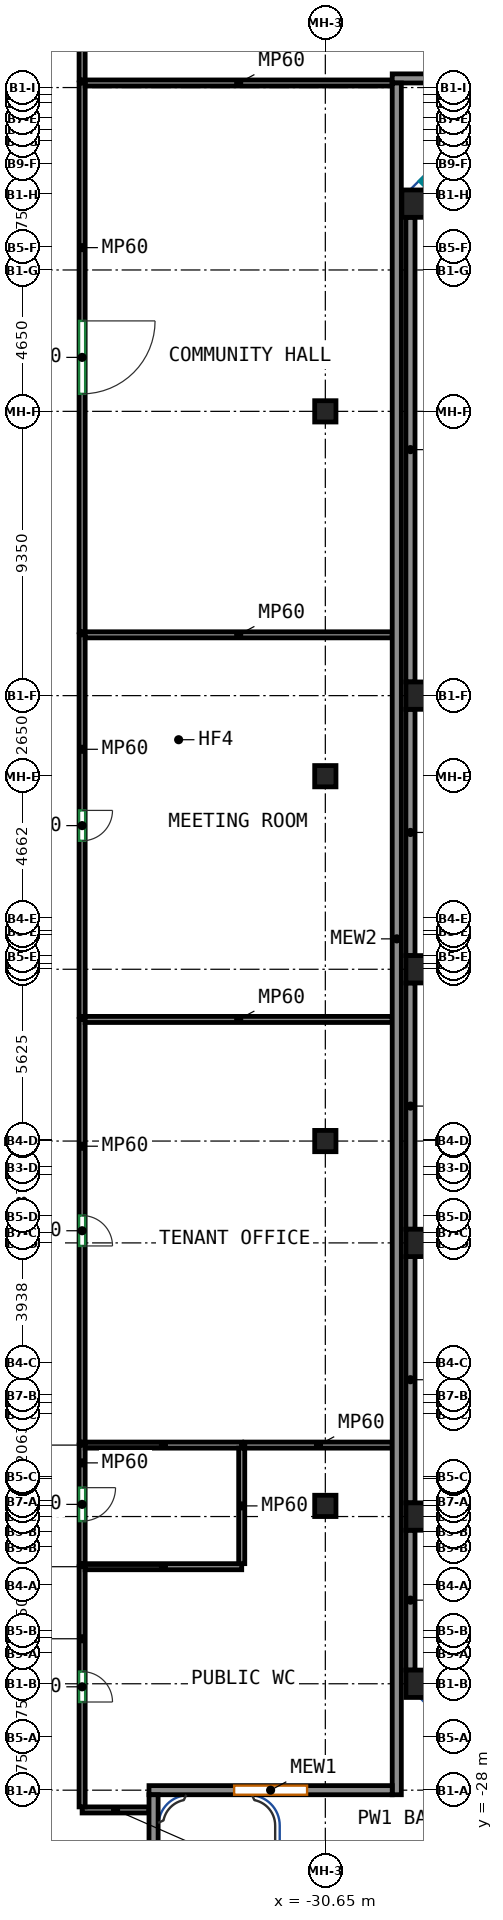
"""IFC4 building model, lengths in metres.
Left out: names, types, materials, properties, quantities, classifications, styles, units other than length and angle.
Written with IfcOpenShell. Run it as: python <this file> out.ifc"""

import sys

from ifc_helpers import new_model, si_unit, direction, frame, frame_2d, origin, origin_2d, place, context, subcontext, project, spatial, rectangle, extrude, source, transform, mapped, element, fill, save


model = new_model("IFC4")
c1 = context("Model", 3, precision=1e-05, world=origin(), true_north=direction((0.0, 1.0)))
c2 = subcontext(c1, "Body", "Model", "MODEL_VIEW")
j1 = project(units=[si_unit("LENGTHUNIT", "METRE"), si_unit("PLANEANGLEUNIT", "RADIAN")], contexts=[c1])
p1 = place(None, origin())
s1 = spatial("IfcSite", under=j1, at=p1, CompositionType="ELEMENT")
p2 = place(p1, origin())
s2 = spatial("IfcBuilding", under=s1, at=p2, CompositionType="ELEMENT")
p3 = place(p2, frame((0.0, 0.0, 18.0)))
s3 = spatial("IfcBuildingStorey", under=s2, at=p3, CompositionType="ELEMENT", Elevation=18.0)
m1 = source(origin(), c2, "Body", "SweptSolid", [
    extrude(rectangle(XDim=0.9, YDim=0.9, at=origin_2d()), origin(), (0.0, 0.0, 1.0), 4.1),
])
for number, where, z_axis, x_axis in (
    (1, (-27.682, 24.182, 0.0), (0.0, 0.0, 1.0), (1.0, 0.0, 0.0)),
    (2, (-27.55, -24.5, 0.0), (0.0, 0.0, 1.0), (1.0, 0.0, 0.0)),
    (3, (-27.55, -19.0, 0.0), (0.0, 0.0, 1.0), (1.0, 0.0, 0.0)),
    (4, (-27.55, -10.0, 0.0), (0.0, 0.0, 1.0), (1.0, 0.0, 0.0)),
    (5, (-27.55, -1.0, 0.0), (0.0, 0.0, 1.0), (1.0, 0.0, 0.0)),
    (6, (-27.55, 8.0, 0.0), (0.0, 0.0, 1.0), (1.0, 0.0, 0.0)),
):
    element("IfcColumn", number, at=place(p3, frame(where, z_axis=z_axis, x_axis=x_axis)), inside=s3, PredefinedType="COLUMN", context=c2, shape_type="MappedRepresentation", body=[
        mapped(m1, transform((0.0, 0.0, 0.0))),
    ])
m2 = source(origin(), c2, "Body", "SweptSolid", [
    extrude(rectangle(XDim=0.7, YDim=0.7, at=origin_2d()), origin(), (0.0, 0.0, 1.0), 4.1),
])
for number, where, z_axis, x_axis in (
    (7, (-30.65, -18.65, 0.0), (0.0, 0.0, 1.0), (1.0, 0.0, 0.0)),
    (8, (-30.65, -6.65, 0.0), (0.0, 0.0, 1.0), (1.0, 0.0, 0.0)),
    (9, (-30.65, 5.35, 0.0), (0.0, 0.0, 1.0), (1.0, 0.0, 0.0)),
    (10, (-30.65, 17.35, 0.0), (0.0, 0.0, 1.0), (1.0, 0.0, 0.0)),
):
    element("IfcColumn", number, at=place(p3, frame(where, z_axis=z_axis, x_axis=x_axis)), inside=s3, PredefinedType="COLUMN", context=c2, shape_type="MappedRepresentation", body=[
        mapped(m2, transform((0.0, 0.0, 0.0))),
    ])
m3 = source(origin(), c2, "Body", "SweptSolid", [
    extrude(rectangle(XDim=15.282, YDim=0.3, at=frame_2d((7.641, 0.0))), origin(), (0.0, 0.0, 1.0), 4.1),
])
p4 = place(p3, frame((-27.85, 23.732, 0.0), z_axis=(0.0, 0.0, 1.0), x_axis=(0.0, -1.0, 0.0)))
e11 = element("IfcWall", 11, at=p4, inside=s3, PredefinedType="SOLIDWALL", context=c2, shape_type="MappedRepresentation", body=[
    mapped(m3, transform((0.0, 0.0, 0.0))),
])
m4 = source(origin(), c2, "Body", "SweptSolid", [
    extrude(rectangle(XDim=8.1, YDim=0.3, at=frame_2d((4.05, 0.0))), origin(), (0.0, 0.0, 1.0), 4.1),
])
for number, where, z_axis, x_axis in (
    (12, (-27.85, 7.55, 0.0), (0.0, 0.0, 1.0), (0.0, -1.0, 0.0)),
    (13, (-27.85, -1.45, 0.0), (0.0, 0.0, 1.0), (0.0, -1.0, 0.0)),
    (14, (-27.85, -10.45, 0.0), (0.0, 0.0, 1.0), (0.0, -1.0, 0.0)),
):
    element("IfcWall", number, at=place(p3, frame(where, z_axis=z_axis, x_axis=x_axis)), inside=s3, PredefinedType="SOLIDWALL", context=c2, shape_type="MappedRepresentation", body=[
        mapped(m4, transform((0.0, 0.0, 0.0))),
    ])
m5 = source(origin(), c2, "Body", "SweptSolid", [
    extrude(rectangle(XDim=4.6, YDim=0.3, at=frame_2d((2.3, 0.0))), origin(), (0.0, 0.0, 1.0), 4.1),
])
p5 = place(p3, frame((-27.85, -19.45, 0.0), z_axis=(0.0, 0.0, 1.0), x_axis=(0.0, -1.0, 0.0)))
e15 = element("IfcWall", 15, at=p5, inside=s3, PredefinedType="SOLIDWALL", context=c2, shape_type="MappedRepresentation", body=[
    mapped(m5, transform((0.0, 0.0, 0.0))),
])
m6 = source(origin(), c2, "Body", "SweptSolid", [
    extrude(rectangle(XDim=56.3, YDim=0.3, at=frame_2d((28.15, 0.0))), origin(), (0.0, 0.0, 1.0), 4.1),
])
p6 = place(p3, frame((27.85, 28.3, 0.0), z_axis=(0.0, 0.0, 1.0), x_axis=(-1.0, 0.0, 0.0)))
e16 = element("IfcWall", 16, at=p6, inside=s3, PredefinedType="SOLIDWALL", context=c2, shape_type="MappedRepresentation", body=[
    mapped(m6, transform((0.0, 0.0, 0.0))),
])
m7 = source(origin(), c2, "Body", "SweptSolid", [
    extrude(rectangle(XDim=56.3, YDim=0.3, at=frame_2d((28.15, 0.0))), origin(), (0.0, 0.0, 1.0), 4.1),
])
p7 = place(p3, frame((-28.3, 28.15, 0.0), z_axis=(0.0, 0.0, 1.0), x_axis=(0.0, -1.0, 0.0)))
e17 = element("IfcWall", 17, at=p7, inside=s3, PredefinedType="SOLIDWALL", context=c2, shape_type="MappedRepresentation", body=[
    mapped(m7, transform((0.0, 0.0, 0.0))),
])
m8 = source(origin(), c2, "Body", "SweptSolid", [
    extrude(rectangle(XDim=8.0, YDim=0.3, at=frame_2d((4.0, 0.0))), origin(), (0.0, 0.0, 1.0), 4.1),
])
p8 = place(p3, frame((-28.45, -28.0, 0.0), z_axis=(0.0, 0.0, 1.0), x_axis=(-1.0, 0.0, 0.0)))
e18 = element("IfcWall", 18, at=p8, inside=s3, PredefinedType="SOLIDWALL", context=c2, shape_type="MappedRepresentation", body=[
    mapped(m8, transform((0.0, 0.0, 0.0))),
])
p9 = place(p8, frame((2.8, 0.0, 0.9)))
e19 = element("IfcOpeningElement", 19, at=p9, cuts=e18, PredefinedType="OPENING", context=c2, shape_type="SweptSolid", body=[
    extrude(rectangle(XDim=2.4, YDim=1.8, at=frame_2d((1.2, 0.9))), frame((0.0, 0.16, 0.0), z_axis=(0.0, -1.0, 0.0), x_axis=(1.0, 0.0, 0.0)), (0.0, 0.0, 1.0), 0.32),
])
m9 = source(origin(), c2, "Body", "SweptSolid", [
    extrude(rectangle(XDim=15.7, YDim=0.3, at=frame_2d((7.85, 0.0))), origin(), (0.0, 0.0, 1.0), 4.1),
])
p10 = place(p3, frame((-36.3, -28.15, 0.0), z_axis=(0.0, 0.0, 1.0), x_axis=(0.0, -1.0, 0.0)))
e20 = element("IfcWall", 20, at=p10, inside=s3, PredefinedType="SOLIDWALL", context=c2, shape_type="MappedRepresentation", body=[
    mapped(m9, transform((0.0, 0.0, 0.0))),
])
p11 = place(p10, frame((6.326, 0.0, 0.0)))
e21 = element("IfcOpeningElement", 21, at=p11, cuts=e20, PredefinedType="OPENING", context=c2, shape_type="SweptSolid", body=[
    extrude(rectangle(XDim=2.4, YDim=2.4, at=frame_2d((1.2, 1.2))), frame((0.0, 0.16, 0.0), z_axis=(0.0, -1.0, 0.0), x_axis=(1.0, 0.0, 0.0)), (0.0, 0.0, 1.0), 0.32),
])
p12 = place(p10, frame((10.997, 0.0, 0.0)))
e22 = element("IfcOpeningElement", 22, at=p12, cuts=e20, PredefinedType="OPENING", context=c2, shape_type="SweptSolid", body=[
    extrude(rectangle(XDim=2.4, YDim=2.4, at=frame_2d((1.2, 1.2))), frame((0.0, 0.16, 0.0), z_axis=(0.0, -1.0, 0.0), x_axis=(1.0, 0.0, 0.0)), (0.0, 0.0, 1.0), 0.32),
])
m10 = source(origin(), c2, "Body", "SweptSolid", [
    extrude(rectangle(XDim=2.2, YDim=0.2, at=frame_2d((1.1, 0.0))), origin(), (0.0, 0.0, 1.0), 3.5),
])
p13 = place(p3, frame((-38.65, -28.65, 0.0), z_axis=(0.0, 0.0, 1.0), x_axis=(1.0, 0.0, 0.0)))
e23 = element("IfcWall", 23, at=p13, inside=s3, PredefinedType="PARTITIONING", context=c2, shape_type="MappedRepresentation", body=[
    mapped(m10, transform((0.0, 0.0, 0.0))),
])
m11 = source(origin(), c2, "Body", "SweptSolid", [
    extrude(rectangle(XDim=7.9, YDim=0.2, at=frame_2d((3.95, 0.0))), origin(), (0.0, 0.0, 1.0), 4.1),
])
p14 = place(p3, frame((-38.65, -20.65, 0.0), z_axis=(0.0, 0.0, 1.0), x_axis=(0.0, -1.0, 0.0)))
e24 = element("IfcWall", 24, at=p14, inside=s3, PredefinedType="PARTITIONING", context=c2, shape_type="MappedRepresentation", body=[
    mapped(m11, transform((0.0, 0.0, 0.0))),
])
p15 = place(p14, frame((3.45, 0.0, 0.0)))
e25 = element("IfcOpeningElement", 25, at=p15, cuts=e24, PredefinedType="OPENING", context=c2, shape_type="SweptSolid", body=[
    extrude(rectangle(XDim=1.0, YDim=2.1, at=frame_2d((0.5, 1.05))), frame((0.0, 0.11, 0.0), z_axis=(0.0, -1.0, 0.0), x_axis=(1.0, 0.0, 0.0)), (0.0, 0.0, 1.0), 0.22),
])
m12 = source(origin(), c2, "Body", "SweptSolid", [
    extrude(rectangle(XDim=5.15, YDim=0.2, at=frame_2d((2.575, 0.0))), origin(), (0.0, 0.0, 1.0), 3.5),
])
p16 = place(p3, frame((-38.55, -20.65, 0.0), z_axis=(0.0, 0.0, 1.0), x_axis=(1.0, 0.0, 0.0)))
e26 = element("IfcWall", 26, at=p16, inside=s3, PredefinedType="PARTITIONING", context=c2, shape_type="MappedRepresentation", body=[
    mapped(m12, transform((0.0, 0.0, 0.0))),
])
m13 = source(origin(), c2, "Body", "SweptSolid", [
    extrude(rectangle(XDim=3.9, YDim=0.2, at=frame_2d((1.95, 0.0))), origin(), (0.0, 0.0, 1.0), 3.3),
])
p17 = place(p3, frame((-38.65, -16.65, 0.0), z_axis=(0.0, 0.0, 1.0), x_axis=(0.0, -1.0, 0.0)))
e27 = element("IfcWall", 27, at=p17, inside=s3, PredefinedType="PARTITIONING", context=c2, shape_type="MappedRepresentation", body=[
    mapped(m13, transform((0.0, 0.0, 0.0))),
])
p18 = place(p17, frame((1.4, 0.0, 0.0)))
e28 = element("IfcOpeningElement", 28, at=p18, cuts=e27, PredefinedType="OPENING", context=c2, shape_type="SweptSolid", body=[
    extrude(rectangle(XDim=1.1, YDim=2.1, at=frame_2d((0.55, 1.05))), frame((0.0, 0.11, 0.0), z_axis=(0.0, -1.0, 0.0), x_axis=(1.0, 0.0, 0.0)), (0.0, 0.0, 1.0), 0.22),
])
p19 = place(p3, frame((-38.55, -16.65, 0.0), z_axis=(0.0, 0.0, 1.0), x_axis=(1.0, 0.0, 0.0)))
e29 = element("IfcWall", 29, at=p19, inside=s3, PredefinedType="PARTITIONING", context=c2, shape_type="MappedRepresentation", body=[
    mapped(m12, transform((0.0, 0.0, 0.0))),
])
m14 = source(origin(), c2, "Body", "SweptSolid", [
    extrude(rectangle(XDim=13.9, YDim=0.2, at=frame_2d((6.95, 0.0))), origin(), (0.0, 0.0, 1.0), 3.3),
])
p20 = place(p3, frame((-38.65, -2.65, 0.0), z_axis=(0.0, 0.0, 1.0), x_axis=(0.0, -1.0, 0.0)))
e30 = element("IfcWall", 30, at=p20, inside=s3, PredefinedType="PARTITIONING", context=c2, shape_type="MappedRepresentation", body=[
    mapped(m14, transform((0.0, 0.0, 0.0))),
])
p21 = place(p20, frame((6.45, 0.0, 0.0)))
e31 = element("IfcOpeningElement", 31, at=p21, cuts=e30, PredefinedType="OPENING", context=c2, shape_type="SweptSolid", body=[
    extrude(rectangle(XDim=1.0, YDim=2.1, at=frame_2d((0.5, 1.05))), frame((0.0, 0.11, 0.0), z_axis=(0.0, -1.0, 0.0), x_axis=(1.0, 0.0, 0.0)), (0.0, 0.0, 1.0), 0.22),
])
m15 = source(origin(), c2, "Body", "SweptSolid", [
    extrude(rectangle(XDim=10.1, YDim=0.2, at=frame_2d((5.05, 0.0))), origin(), (0.0, 0.0, 1.0), 3.3),
])
p22 = place(p3, frame((-38.55, -2.65, 0.0), z_axis=(0.0, 0.0, 1.0), x_axis=(1.0, 0.0, 0.0)))
e32 = element("IfcWall", 32, at=p22, inside=s3, PredefinedType="PARTITIONING", context=c2, shape_type="MappedRepresentation", body=[
    mapped(m15, transform((0.0, 0.0, 0.0))),
])
m16 = source(origin(), c2, "Body", "SweptSolid", [
    extrude(rectangle(XDim=12.55, YDim=0.2, at=frame_2d((6.275, 0.0))), origin(), (0.0, 0.0, 1.0), 3.3),
])
p23 = place(p3, frame((-38.65, 10.0, 0.0), z_axis=(0.0, 0.0, 1.0), x_axis=(0.0, -1.0, 0.0)))
e33 = element("IfcWall", 33, at=p23, inside=s3, PredefinedType="PARTITIONING", context=c2, shape_type="MappedRepresentation", body=[
    mapped(m16, transform((0.0, 0.0, 0.0))),
])
p24 = place(p23, frame((5.775, 0.0, 0.0)))
e34 = element("IfcOpeningElement", 34, at=p24, cuts=e33, PredefinedType="OPENING", context=c2, shape_type="SweptSolid", body=[
    extrude(rectangle(XDim=1.0, YDim=2.1, at=frame_2d((0.5, 1.05))), frame((0.0, 0.11, 0.0), z_axis=(0.0, -1.0, 0.0), x_axis=(1.0, 0.0, 0.0)), (0.0, 0.0, 1.0), 0.22),
])
p25 = place(p3, frame((-38.55, 10.0, 0.0), z_axis=(0.0, 0.0, 1.0), x_axis=(1.0, 0.0, 0.0)))
e35 = element("IfcWall", 35, at=p25, inside=s3, PredefinedType="PARTITIONING", context=c2, shape_type="MappedRepresentation", body=[
    mapped(m15, transform((0.0, 0.0, 0.0))),
])
m17 = source(origin(), c2, "Body", "SweptSolid", [
    extrude(rectangle(XDim=18.05, YDim=0.2, at=frame_2d((9.025, 0.0))), origin(), (0.0, 0.0, 1.0), 3.3),
])
p26 = place(p3, frame((-38.65, 28.15, 0.0), z_axis=(0.0, 0.0, 1.0), x_axis=(0.0, -1.0, 0.0)))
e36 = element("IfcWall", 36, at=p26, inside=s3, PredefinedType="PARTITIONING", context=c2, shape_type="MappedRepresentation", body=[
    mapped(m17, transform((0.0, 0.0, 0.0))),
])
p27 = place(p26, frame((7.825, 0.0, 0.0)))
e37 = element("IfcOpeningElement", 37, at=p27, cuts=e36, PredefinedType="OPENING", context=c2, shape_type="SweptSolid", body=[
    extrude(rectangle(XDim=2.4, YDim=2.4, at=frame_2d((1.2, 1.2))), frame((0.0, 0.11, 0.0), z_axis=(0.0, -1.0, 0.0), x_axis=(1.0, 0.0, 0.0)), (0.0, 0.0, 1.0), 0.22),
])
p28 = place(p3, frame((-38.55, 28.15, 0.0), z_axis=(0.0, 0.0, 1.0), x_axis=(1.0, 0.0, 0.0)))
e38 = element("IfcWall", 38, at=p28, inside=s3, PredefinedType="PARTITIONING", context=c2, shape_type="MappedRepresentation", body=[
    mapped(m15, transform((0.0, 0.0, 0.0))),
])
m18 = source(origin(), c2, "Body", "SweptSolid", [
    extrude(rectangle(XDim=10.4, YDim=0.2, at=frame_2d((5.2, 0.0))), origin(), (0.0, 0.0, 1.0), 3.3),
])
p29 = place(p3, frame((-38.65, 38.65, 0.0), z_axis=(0.0, 0.0, 1.0), x_axis=(0.0, -1.0, 0.0)))
e39 = element("IfcWall", 39, at=p29, inside=s3, PredefinedType="PARTITIONING", context=c2, shape_type="MappedRepresentation", body=[
    mapped(m18, transform((0.0, 0.0, 0.0))),
])
m19 = source(origin(), c2, "Body", "SweptSolid", [
    extrude(rectangle(XDim=3.8, YDim=0.2, at=frame_2d((1.9, 0.0))), origin(), (0.0, 0.0, 1.0), 3.3),
])
p30 = place(p3, frame((-33.4, -20.55, 0.0), z_axis=(0.0, 0.0, 1.0), x_axis=(0.0, 1.0, 0.0)))
e40 = element("IfcWall", 40, at=p30, inside=s3, PredefinedType="PARTITIONING", context=c2, shape_type="MappedRepresentation", body=[
    mapped(m19, transform((0.0, 0.0, 0.0))),
])
m20 = source(origin(), c2, "Body", "SweptSolid", [
    extrude(rectangle(XDim=4.85, YDim=0.2, at=frame_2d((2.425, 0.0))), origin(), (0.0, 0.0, 1.0), 3.3),
])
p31 = place(p3, frame((-33.3, -16.65, 0.0), z_axis=(0.0, 0.0, 1.0), x_axis=(1.0, 0.0, 0.0)))
e41 = element("IfcWall", 41, at=p31, inside=s3, PredefinedType="PARTITIONING", context=c2, shape_type="MappedRepresentation", body=[
    mapped(m20, transform((0.0, 0.0, 0.0))),
])
p32 = place(p9, origin())
e42 = element("IfcWindow", 42, at=p32, inside=s3, PartitioningType="SINGLE_PANEL", PredefinedType="WINDOW", context=c2, shape_type="SweptSolid", body=[
    extrude(rectangle(XDim=2.4, YDim=1.8, at=frame_2d((1.2, 0.9))), frame((0.0, 0.03, 0.0), z_axis=(0.0, -1.0, 0.0), x_axis=(1.0, 0.0, 0.0)), (0.0, 0.0, 1.0), 0.06),
])
fill(e19, e42)
p33 = place(p15, origin())
e43 = element("IfcDoor", 43, at=p33, inside=s3, OperationType="SINGLE_SWING_RIGHT", PredefinedType="DOOR", context=c2, shape_type="SweptSolid", body=[
    extrude(rectangle(XDim=1.0, YDim=2.1, at=frame_2d((0.5, 1.05))), frame((0.0, 0.025, 0.0), z_axis=(0.0, -1.0, 0.0), x_axis=(1.0, 0.0, 0.0)), (0.0, 0.0, 1.0), 0.05),
])
fill(e25, e43)
p34 = place(p18, origin())
e44 = element("IfcDoor", 44, at=p34, inside=s3, OperationType="SINGLE_SWING_LEFT", PredefinedType="DOOR", context=c2, shape_type="SweptSolid", body=[
    extrude(rectangle(XDim=1.1, YDim=2.1, at=frame_2d((0.55, 1.05))), frame((0.0, 0.025, 0.0), z_axis=(0.0, -1.0, 0.0), x_axis=(1.0, 0.0, 0.0)), (0.0, 0.0, 1.0), 0.05),
])
fill(e28, e44)
p35 = place(p21, origin())
e45 = element("IfcDoor", 45, at=p35, inside=s3, OperationType="SINGLE_SWING_RIGHT", PredefinedType="DOOR", context=c2, shape_type="SweptSolid", body=[
    extrude(rectangle(XDim=1.0, YDim=2.1, at=frame_2d((0.5, 1.05))), frame((0.0, 0.025, 0.0), z_axis=(0.0, -1.0, 0.0), x_axis=(1.0, 0.0, 0.0)), (0.0, 0.0, 1.0), 0.05),
])
fill(e31, e45)
p36 = place(p24, origin())
e46 = element("IfcDoor", 46, at=p36, inside=s3, OperationType="SINGLE_SWING_LEFT", PredefinedType="DOOR", context=c2, shape_type="SweptSolid", body=[
    extrude(rectangle(XDim=1.0, YDim=2.1, at=frame_2d((0.5, 1.05))), frame((0.0, 0.025, 0.0), z_axis=(0.0, -1.0, 0.0), x_axis=(1.0, 0.0, 0.0)), (0.0, 0.0, 1.0), 0.05),
])
fill(e34, e46)
p37 = place(p27, origin())
e47 = element("IfcDoor", 47, at=p37, inside=s3, OperationType="DOUBLE_DOOR_SINGLE_SWING", PredefinedType="DOOR", context=c2, shape_type="SweptSolid", body=[
    extrude(rectangle(XDim=2.4, YDim=2.4, at=frame_2d((1.2, 1.2))), frame((0.0, 0.025, 0.0), z_axis=(0.0, -1.0, 0.0), x_axis=(1.0, 0.0, 0.0)), (0.0, 0.0, 1.0), 0.05),
])
fill(e37, e47)
save(model, sys.argv[1])
